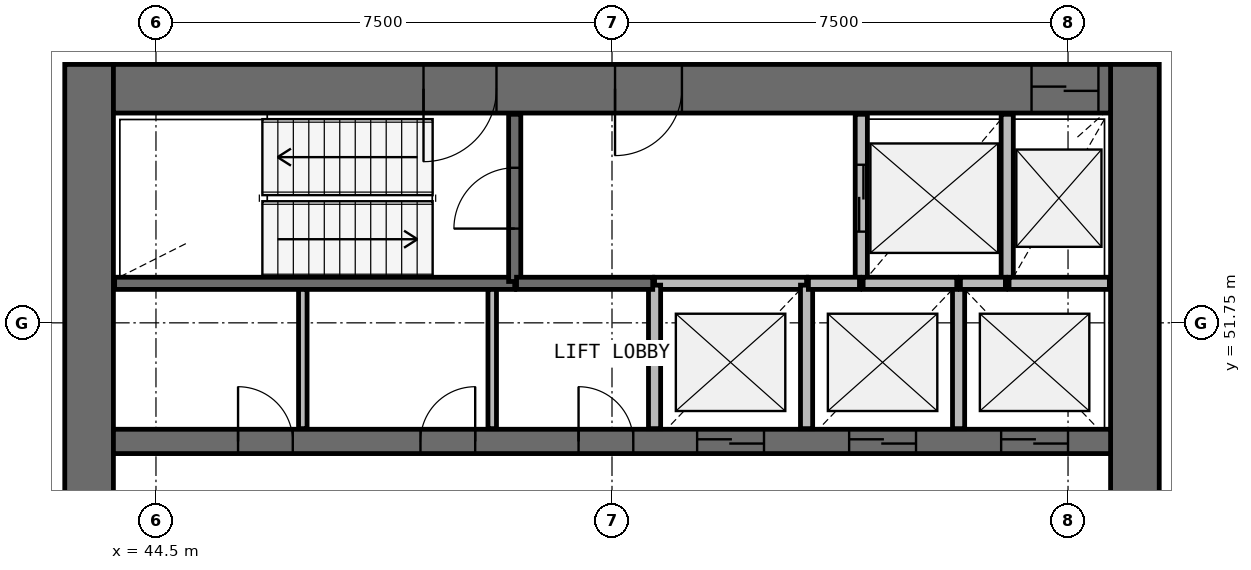
"""IFC4 building model, lengths in metres.
Left out: names, types, materials, properties, quantities, classifications, styles, units other than length and angle.
Written with IfcOpenShell. Run it as: python <this file> out.ifc"""

import sys

from ifc_helpers import new_model, si_unit, direction, frame, frame_2d, origin, place, context, subcontext, project, spatial, rectangle, extrude, source, transform, mapped, element, fill, save


model = new_model("IFC4")
c1 = context("Model", 3, precision=1e-05, world=origin(), true_north=direction((0.0, 1.0)))
c2 = subcontext(c1, "Body", "Model", "MODEL_VIEW")
j1 = project(units=[si_unit("LENGTHUNIT", "METRE"), si_unit("PLANEANGLEUNIT", "RADIAN")], contexts=[c1])
p1 = place(None, origin())
s1 = spatial("IfcSite", under=j1, at=p1, CompositionType="ELEMENT")
p2 = place(p1, origin())
s2 = spatial("IfcBuilding", under=s1, at=p2, CompositionType="ELEMENT")
p3 = place(p2, frame((0.0, 0.0, 148.7)))
s3 = spatial("IfcBuildingStorey", under=s2, at=p3, CompositionType="ELEMENT", Elevation=148.7)
p4 = place(p3, frame((60.6, 40.0, 0.0), z_axis=(0.0, 0.0, 1.0), x_axis=(0.0, 1.0, 0.0)))
e1 = element("IfcWall", 1, at=p4, inside=s3, PredefinedType="SHEAR", context=c2, shape_type="SweptSolid", body=[
    extrude(rectangle(XDim=16.0, YDim=0.8, at=frame_2d((8.0, 0.0))), origin(), (0.0, 0.0, 1.0), 3.9),
])
p5 = place(p4, frame((7.1, 0.0, 0.0)))
e2 = element("IfcOpeningElement", 2, at=p5, cuts=e1, PredefinedType="OPENING", context=c2, shape_type="SweptSolid", body=[
    extrude(rectangle(XDim=1.8, YDim=2.1, at=frame_2d((0.9, 1.05))), frame((0.0, 0.41, 0.0), z_axis=(0.0, -1.0, 0.0), x_axis=(1.0, 0.0, 0.0)), (0.0, 0.0, 1.0), 0.82),
])
p6 = place(p3, frame((43.4, 56.0, 0.0), z_axis=(0.0, 0.0, 1.0), x_axis=(0.0, -1.0, 0.0)))
e3 = element("IfcWall", 3, at=p6, inside=s3, PredefinedType="SHEAR", context=c2, shape_type="SweptSolid", body=[
    extrude(rectangle(XDim=16.0, YDim=0.8, at=frame_2d((8.0, 0.0))), origin(), (0.0, 0.0, 1.0), 3.9),
])
p7 = place(p6, frame((7.1, 0.0, 0.0)))
e4 = element("IfcOpeningElement", 4, at=p7, cuts=e3, PredefinedType="OPENING", context=c2, shape_type="SweptSolid", body=[
    extrude(rectangle(XDim=1.8, YDim=2.1, at=frame_2d((0.9, 1.05))), frame((0.0, 0.41, 0.0), z_axis=(0.0, -1.0, 0.0), x_axis=(1.0, 0.0, 0.0)), (0.0, 0.0, 1.0), 0.82),
])
p8 = place(p3, frame((60.2, 55.6, 0.0), z_axis=(0.0, 0.0, 1.0), x_axis=(-1.0, 0.0, 0.0)))
e5 = element("IfcWall", 5, at=p8, inside=s3, PredefinedType="SHEAR", context=c2, shape_type="SweptSolid", body=[
    extrude(rectangle(XDim=16.4, YDim=0.8, at=frame_2d((8.2, 0.0))), origin(), (0.0, 0.0, 1.0), 3.9),
])
p9 = place(p8, frame((0.2, 0.0, 0.0)))
e6 = element("IfcOpeningElement", 6, at=p9, cuts=e5, PredefinedType="OPENING", context=c2, shape_type="SweptSolid", body=[
    extrude(rectangle(XDim=1.1, YDim=2.1, at=frame_2d((0.55, 1.05))), frame((0.0, 0.41, 0.0), z_axis=(0.0, -1.0, 0.0), x_axis=(1.0, 0.0, 0.0)), (0.0, 0.0, 1.0), 0.82),
])
p10 = place(p8, frame((10.1, 0.0, 0.0)))
e7 = element("IfcOpeningElement", 7, at=p10, cuts=e5, PredefinedType="OPENING", context=c2, shape_type="SweptSolid", body=[
    extrude(rectangle(XDim=1.2, YDim=2.1, at=frame_2d((0.6, 1.05))), frame((0.0, 0.41, 0.0), z_axis=(0.0, -1.0, 0.0), x_axis=(1.0, 0.0, 0.0)), (0.0, 0.0, 1.0), 0.82),
])
p11 = place(p8, frame((7.05, 0.0, 0.0)))
e8 = element("IfcOpeningElement", 8, at=p11, cuts=e5, PredefinedType="OPENING", context=c2, shape_type="SweptSolid", body=[
    extrude(rectangle(XDim=1.1, YDim=2.1, at=frame_2d((0.55, 1.05))), frame((0.0, 0.41, 0.0), z_axis=(0.0, -1.0, 0.0), x_axis=(1.0, 0.0, 0.0)), (0.0, 0.0, 1.0), 0.82),
])
p12 = place(p3, frame((43.8, 49.8, 0.0), z_axis=(0.0, 0.0, 1.0), x_axis=(1.0, 0.0, 0.0)))
e9 = element("IfcWall", 9, at=p12, inside=s3, PredefinedType="SHEAR", context=c2, shape_type="SweptSolid", body=[
    extrude(rectangle(XDim=16.4, YDim=0.4, at=frame_2d((8.2, 0.0))), origin(), (0.0, 0.0, 1.0), 3.9),
])
p13 = place(p12, frame((9.6, 0.0, 0.0)))
e10 = element("IfcOpeningElement", 10, at=p13, cuts=e9, PredefinedType="OPENING", context=c2, shape_type="SweptSolid", body=[
    extrude(rectangle(XDim=1.1, YDim=2.1, at=frame_2d((0.55, 1.05))), frame((0.0, 0.21, 0.0), z_axis=(0.0, -1.0, 0.0), x_axis=(1.0, 0.0, 0.0)), (0.0, 0.0, 1.0), 0.42),
])
p14 = place(p12, frame((12.1, 0.0, 0.0)))
e11 = element("IfcOpeningElement", 11, at=p14, cuts=e9, PredefinedType="OPENING", context=c2, shape_type="SweptSolid", body=[
    extrude(rectangle(XDim=1.1, YDim=2.1, at=frame_2d((0.55, 1.05))), frame((0.0, 0.21, 0.0), z_axis=(0.0, -1.0, 0.0), x_axis=(1.0, 0.0, 0.0)), (0.0, 0.0, 1.0), 0.42),
])
p15 = place(p12, frame((14.6, 0.0, 0.0)))
e12 = element("IfcOpeningElement", 12, at=p15, cuts=e9, PredefinedType="OPENING", context=c2, shape_type="SweptSolid", body=[
    extrude(rectangle(XDim=1.1, YDim=2.1, at=frame_2d((0.55, 1.05))), frame((0.0, 0.21, 0.0), z_axis=(0.0, -1.0, 0.0), x_axis=(1.0, 0.0, 0.0)), (0.0, 0.0, 1.0), 0.42),
])
p16 = place(p12, frame((2.05, 0.0, 0.0)))
e13 = element("IfcOpeningElement", 13, at=p16, cuts=e9, PredefinedType="OPENING", context=c2, shape_type="SweptSolid", body=[
    extrude(rectangle(XDim=0.9, YDim=2.1, at=frame_2d((0.45, 1.05))), frame((0.0, 0.21, 0.0), z_axis=(0.0, -1.0, 0.0), x_axis=(1.0, 0.0, 0.0)), (0.0, 0.0, 1.0), 0.42),
])
p17 = place(p12, frame((5.05, 0.0, 0.0)))
e14 = element("IfcOpeningElement", 14, at=p17, cuts=e9, PredefinedType="OPENING", context=c2, shape_type="SweptSolid", body=[
    extrude(rectangle(XDim=0.9, YDim=2.1, at=frame_2d((0.45, 1.05))), frame((0.0, 0.21, 0.0), z_axis=(0.0, -1.0, 0.0), x_axis=(1.0, 0.0, 0.0)), (0.0, 0.0, 1.0), 0.42),
])
p18 = place(p12, frame((7.65, 0.0, 0.0)))
e15 = element("IfcOpeningElement", 15, at=p18, cuts=e9, PredefinedType="OPENING", context=c2, shape_type="SweptSolid", body=[
    extrude(rectangle(XDim=0.9, YDim=2.1, at=frame_2d((0.45, 1.05))), frame((0.0, 0.21, 0.0), z_axis=(0.0, -1.0, 0.0), x_axis=(1.0, 0.0, 0.0)), (0.0, 0.0, 1.0), 0.42),
])
p19 = place(p3, frame((43.82, 52.4, 0.0), z_axis=(0.0, 0.0, 1.0), x_axis=(1.0, 0.0, 0.0)))
e16 = element("IfcWall", 16, at=p19, inside=s3, PredefinedType="SOLIDWALL", context=c2, shape_type="SweptSolid", body=[
    extrude(rectangle(XDim=6.58, YDim=0.2, at=frame_2d((3.29, 0.0))), origin(), (0.0, 0.0, 1.0), 3.58),
])
p20 = place(p3, frame((50.4, 52.43, 0.0), z_axis=(0.0, 0.0, 1.0), x_axis=(0.0, 1.0, 0.0)))
e17 = element("IfcWall", 17, at=p20, inside=s3, PredefinedType="SOLIDWALL", context=c2, shape_type="SweptSolid", body=[
    extrude(rectangle(XDim=2.75, YDim=0.2, at=frame_2d((1.375, 0.0))), origin(), (0.0, 0.0, 1.0), 3.58),
])
p21 = place(p20, frame((0.87, 0.0, 0.0)))
e18 = element("IfcOpeningElement", 18, at=p21, cuts=e17, PredefinedType="OPENING", context=c2, shape_type="SweptSolid", body=[
    extrude(rectangle(XDim=1.0, YDim=2.1, at=frame_2d((0.5, 1.05))), frame((0.0, 0.11, 0.0), z_axis=(0.0, -1.0, 0.0), x_axis=(1.0, 0.0, 0.0)), (0.0, 0.0, 1.0), 0.22),
])
p22 = place(p3, frame((56.1, 55.18, 0.0), z_axis=(0.0, 0.0, 1.0), x_axis=(0.0, -1.0, 0.0)))
e19 = element("IfcWall", 19, at=p22, inside=s3, PredefinedType="SOLIDWALL", context=c2, shape_type="SweptSolid", body=[
    extrude(rectangle(XDim=2.78, YDim=0.2, at=frame_2d((1.39, 0.0))), origin(), (0.0, 0.0, 1.0), 3.58),
])
p23 = place(p22, frame((0.83, 0.0, 0.0)))
e20 = element("IfcOpeningElement", 20, at=p23, cuts=e19, PredefinedType="OPENING", context=c2, shape_type="SweptSolid", body=[
    extrude(rectangle(XDim=1.1, YDim=2.1, at=frame_2d((0.55, 1.05))), frame((0.0, 0.11, 0.0), z_axis=(0.0, -1.0, 0.0), x_axis=(1.0, 0.0, 0.0)), (0.0, 0.0, 1.0), 0.22),
])
p24 = place(p3, frame((58.5, 52.4, 0.0), z_axis=(0.0, 0.0, 1.0), x_axis=(0.0, 1.0, 0.0)))
e21 = element("IfcWall", 21, at=p24, inside=s3, PredefinedType="SOLIDWALL", context=c2, shape_type="SweptSolid", body=[
    extrude(rectangle(XDim=2.78, YDim=0.2, at=frame_2d((1.39, 0.0))), origin(), (0.0, 0.0, 1.0), 3.58),
])
p25 = place(p3, frame((55.2, 52.4, 0.0), z_axis=(0.0, 0.0, 1.0), x_axis=(-1.0, 0.0, 0.0)))
e22 = element("IfcWall", 22, at=p25, inside=s3, PredefinedType="SOLIDWALL", context=c2, shape_type="SweptSolid", body=[
    extrude(rectangle(XDim=2.5, YDim=0.2, at=frame_2d((1.25, 0.0))), origin(), (0.0, 0.0, 1.0), 3.58),
])
for number, where, z_axis, x_axis in (
    (23, (52.7, 52.37, 0.0), (0.0, 0.0, 1.0), (0.0, -1.0, 0.0)),
    (24, (55.2, 50.01, 0.0), (0.0, 0.0, 1.0), (0.0, 1.0, 0.0)),
):
    element("IfcWall", number, at=place(p3, frame(where, z_axis=z_axis, x_axis=x_axis)), inside=s3, PredefinedType="SOLIDWALL", context=c2, shape_type="SweptSolid", body=[
        extrude(rectangle(XDim=2.36, YDim=0.2, at=frame_2d((1.18, 0.0))), origin(), (0.0, 0.0, 1.0), 3.58),
    ])
p26 = place(p3, frame((57.7, 50.01, 0.0), z_axis=(0.0, 0.0, 1.0), x_axis=(0.0, 1.0, 0.0)))
e25 = element("IfcWall", 25, at=p26, inside=s3, PredefinedType="SOLIDWALL", context=c2, shape_type="SweptSolid", body=[
    extrude(rectangle(XDim=2.39, YDim=0.2, at=frame_2d((1.195, 0.0))), origin(), (0.0, 0.0, 1.0), 3.58),
])
p27 = place(p3, frame((50.43, 52.4, 0.0), z_axis=(0.0, 0.0, 1.0), x_axis=(1.0, 0.0, 0.0)))
e26 = element("IfcWall", 26, at=p27, inside=s3, PredefinedType="SOLIDWALL", context=c2, shape_type="SweptSolid", body=[
    extrude(rectangle(XDim=2.24, YDim=0.2, at=frame_2d((1.12, 0.0))), origin(), (0.0, 0.0, 1.0), 3.58),
])
p28 = place(p3, frame((60.18, 52.4, 0.0), z_axis=(0.0, 0.0, 1.0), x_axis=(-1.0, 0.0, 0.0)))
e27 = element("IfcWall", 27, at=p28, inside=s3, PredefinedType="SOLIDWALL", context=c2, shape_type="SweptSolid", body=[
    extrude(rectangle(XDim=1.65, YDim=0.2, at=frame_2d((0.825, 0.0))), origin(), (0.0, 0.0, 1.0), 3.58),
])
p29 = place(p3, frame((57.67, 52.4, 0.0), z_axis=(0.0, 0.0, 1.0), x_axis=(-1.0, 0.0, 0.0)))
e28 = element("IfcWall", 28, at=p29, inside=s3, PredefinedType="SOLIDWALL", context=c2, shape_type="SweptSolid", body=[
    extrude(rectangle(XDim=1.54, YDim=0.2, at=frame_2d((0.77, 0.0))), origin(), (0.0, 0.0, 1.0), 3.58),
])
p30 = place(p3, frame((56.07, 52.4, 0.0), z_axis=(0.0, 0.0, 1.0), x_axis=(-1.0, 0.0, 0.0)))
e29 = element("IfcWall", 29, at=p30, inside=s3, PredefinedType="SOLIDWALL", context=c2, shape_type="SweptSolid", body=[
    extrude(rectangle(XDim=0.84, YDim=0.2, at=frame_2d((0.42, 0.0))), origin(), (0.0, 0.0, 1.0), 3.58),
])
p31 = place(p3, frame((58.47, 52.4, 0.0), z_axis=(0.0, 0.0, 1.0), x_axis=(-1.0, 0.0, 0.0)))
e30 = element("IfcWall", 30, at=p31, inside=s3, PredefinedType="SOLIDWALL", context=c2, shape_type="SweptSolid", body=[
    extrude(rectangle(XDim=0.74, YDim=0.2, at=frame_2d((0.37, 0.0))), origin(), (0.0, 0.0, 1.0), 3.58),
])
for number, where, z_axis, x_axis in (
    (31, (46.915, 50.01, 0.0), (0.0, 0.0, 1.0), (0.0, 1.0, 0.0)),
    (32, (50.03, 50.01, 0.0), (0.0, 0.0, 1.0), (0.0, 1.0, 0.0)),
):
    element("IfcWall", number, at=place(p3, frame(where, z_axis=z_axis, x_axis=x_axis)), inside=s3, PredefinedType="PARTITIONING", context=c2, shape_type="SweptSolid", body=[
        extrude(rectangle(XDim=2.29, YDim=0.14, at=frame_2d((1.145, 0.0))), origin(), (0.0, 0.0, 1.0), 2.88),
    ])
m1 = source(origin(), c2, "Body", "SweptSolid", [
    extrude(rectangle(XDim=1.1, YDim=2.1, at=frame_2d((0.55, 1.05))), frame((0.0, 0.025, 0.0), z_axis=(0.0, -1.0, 0.0), x_axis=(1.0, 0.0, 0.0)), (0.0, 0.0, 1.0), 0.05),
])
p32 = place(p13, origin())
e33 = element("IfcDoor", 33, at=p32, inside=s3, OperationType="DOUBLE_DOOR_SLIDING", PredefinedType="USERDEFINED", context=c2, shape_type="MappedRepresentation", body=[
    mapped(m1, transform((0.0, 0.0, 0.0), scale=1.0)),
])
fill(e10, e33)
p33 = place(p14, origin())
e34 = element("IfcDoor", 34, at=p33, inside=s3, OperationType="DOUBLE_DOOR_SLIDING", PredefinedType="USERDEFINED", context=c2, shape_type="MappedRepresentation", body=[
    mapped(m1, transform((0.0, 0.0, 0.0), scale=1.0)),
])
fill(e11, e34)
p34 = place(p15, origin())
e35 = element("IfcDoor", 35, at=p34, inside=s3, OperationType="DOUBLE_DOOR_SLIDING", PredefinedType="USERDEFINED", context=c2, shape_type="MappedRepresentation", body=[
    mapped(m1, transform((0.0, 0.0, 0.0), scale=1.0)),
])
fill(e12, e35)
p35 = place(p23, origin())
e36 = element("IfcDoor", 36, at=p35, inside=s3, OperationType="DOUBLE_DOOR_SLIDING", PredefinedType="USERDEFINED", context=c2, shape_type="MappedRepresentation", body=[
    mapped(m1, transform((0.0, 0.0, 0.0), scale=1.0)),
])
fill(e20, e36)
p36 = place(p9, origin())
e37 = element("IfcDoor", 37, at=p36, inside=s3, OperationType="DOUBLE_DOOR_SLIDING", PredefinedType="USERDEFINED", context=c2, shape_type="MappedRepresentation", body=[
    mapped(m1, transform((0.0, 0.0, 0.0), scale=1.0)),
])
fill(e6, e37)
m2 = source(origin(), c2, "Body", "SweptSolid", [
    extrude(rectangle(XDim=1.2, YDim=2.1, at=frame_2d((0.6, 1.05))), frame((0.0, 0.025, 0.0), z_axis=(0.0, -1.0, 0.0), x_axis=(1.0, 0.0, 0.0)), (0.0, 0.0, 1.0), 0.05),
])
p37 = place(p10, origin())
e38 = element("IfcDoor", 38, at=p37, inside=s3, OperationType="SINGLE_SWING_RIGHT", PredefinedType="DOOR", context=c2, shape_type="MappedRepresentation", body=[
    mapped(m2, transform((0.0, 0.0, 0.0), scale=1.0)),
])
fill(e7, e38)
m3 = source(origin(), c2, "Body", "SweptSolid", [
    extrude(rectangle(XDim=1.0, YDim=2.1, at=frame_2d((0.5, 1.05))), frame((0.0, 0.025, 0.0), z_axis=(0.0, -1.0, 0.0), x_axis=(1.0, 0.0, 0.0)), (0.0, 0.0, 1.0), 0.05),
])
p38 = place(p21, origin())
e39 = element("IfcDoor", 39, at=p38, inside=s3, OperationType="SINGLE_SWING_LEFT", PredefinedType="DOOR", context=c2, shape_type="MappedRepresentation", body=[
    mapped(m3, transform((0.0, 0.0, 0.0), scale=1.0)),
])
fill(e18, e39)
m4 = source(origin(), c2, "Body", "SweptSolid", [
    extrude(rectangle(XDim=1.1, YDim=2.1, at=frame_2d((0.55, 1.05))), frame((0.0, 0.025, 0.0), z_axis=(0.0, -1.0, 0.0), x_axis=(1.0, 0.0, 0.0)), (0.0, 0.0, 1.0), 0.05),
])
p39 = place(p11, origin())
e40 = element("IfcDoor", 40, at=p39, inside=s3, OperationType="SINGLE_SWING_RIGHT", PredefinedType="DOOR", context=c2, shape_type="MappedRepresentation", body=[
    mapped(m4, transform((0.0, 0.0, 0.0), scale=1.0)),
])
fill(e8, e40)
m5 = source(origin(), c2, "Body", "SweptSolid", [
    extrude(rectangle(XDim=0.9, YDim=2.1, at=frame_2d((0.45, 1.05))), frame((0.0, 0.025, 0.0), z_axis=(0.0, -1.0, 0.0), x_axis=(1.0, 0.0, 0.0)), (0.0, 0.0, 1.0), 0.05),
])
p40 = place(p16, origin())
e41 = element("IfcDoor", 41, at=p40, inside=s3, OperationType="SINGLE_SWING_LEFT", PredefinedType="DOOR", context=c2, shape_type="MappedRepresentation", body=[
    mapped(m5, transform((0.0, 0.0, 0.0), scale=1.0)),
])
fill(e13, e41)
p41 = place(p17, origin())
e42 = element("IfcDoor", 42, at=p41, inside=s3, OperationType="SINGLE_SWING_RIGHT", PredefinedType="DOOR", context=c2, shape_type="MappedRepresentation", body=[
    mapped(m5, transform((0.0, 0.0, 0.0), scale=1.0)),
])
fill(e14, e42)
p42 = place(p18, origin())
e43 = element("IfcDoor", 43, at=p42, inside=s3, OperationType="SINGLE_SWING_LEFT", PredefinedType="DOOR", context=c2, shape_type="MappedRepresentation", body=[
    mapped(m5, transform((0.0, 0.0, 0.0), scale=1.0)),
])
fill(e15, e43)
save(model, sys.argv[1])
